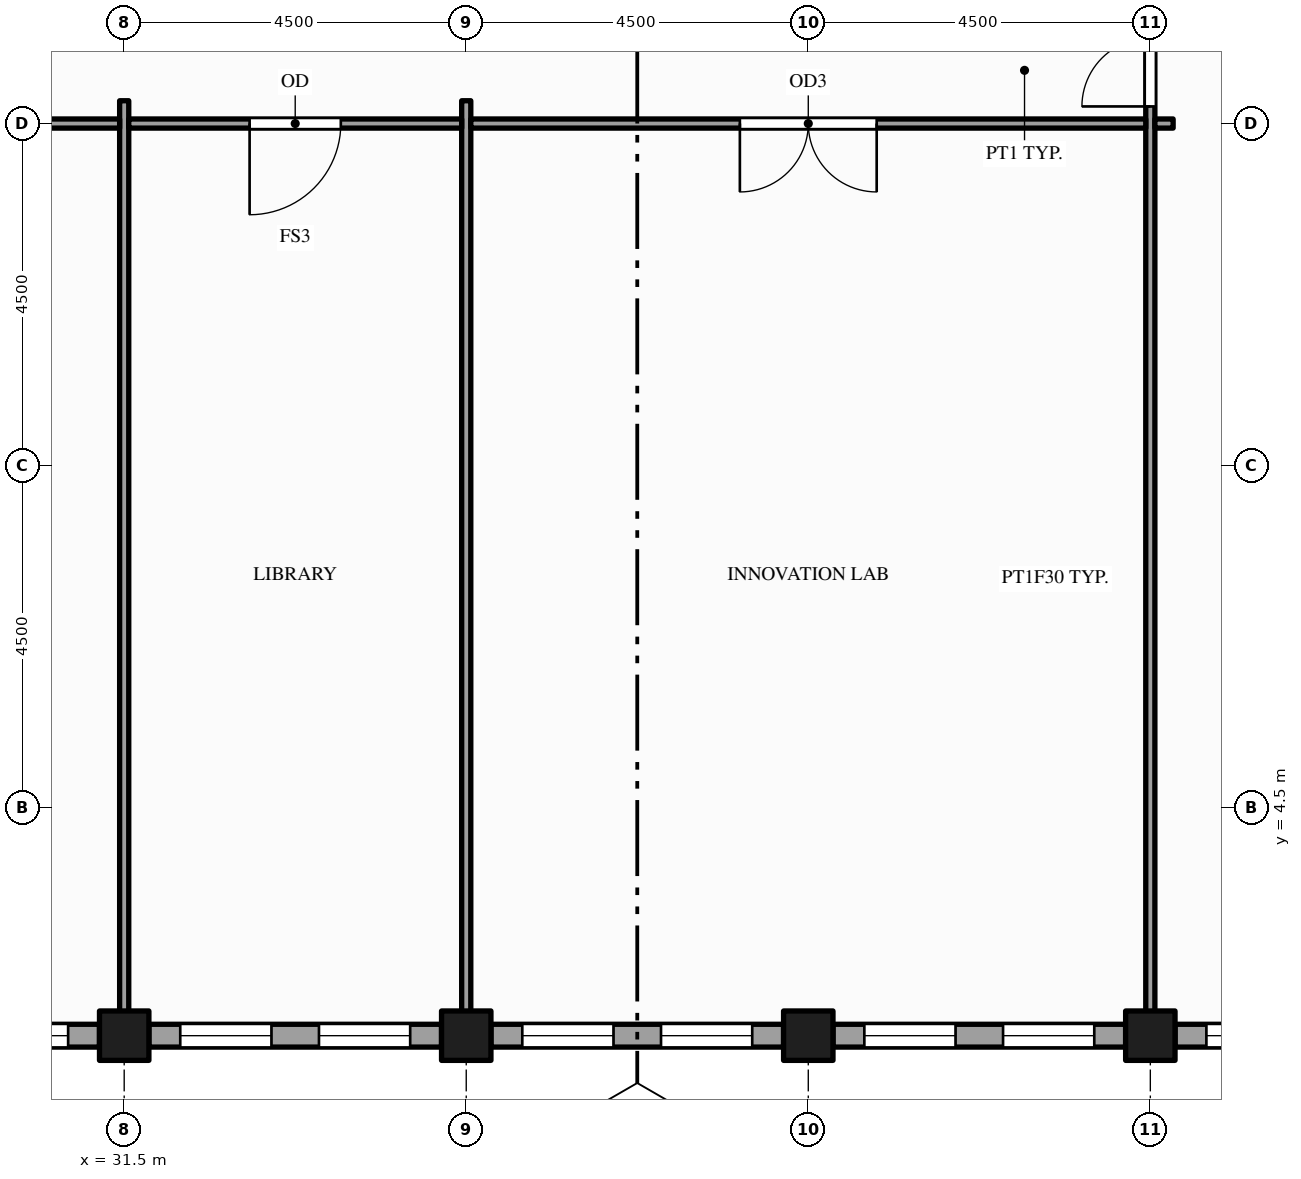
"""IFC4 building model, lengths in metres.
Left out: names, types, materials, properties, quantities, classifications, styles, units other than length and angle.
Written with IfcOpenShell. Run it as: python <this file> out.ifc"""

import sys

from ifc_helpers import new_model, si_unit, direction, frame, frame_2d, origin, origin_2d, place, context, subcontext, project, spatial, rectangle, hollow_rectangle, extrude, element, fill, save


model = new_model("IFC4")
c1 = context("Model", 3, precision=1e-05, world=origin(), true_north=direction((0.0, 1.0)))
c2 = subcontext(c1, "Body", "Model", "MODEL_VIEW")
j1 = project(units=[si_unit("LENGTHUNIT", "METRE"), si_unit("PLANEANGLEUNIT", "RADIAN")], contexts=[c1])
p1 = place(None, origin())
s1 = spatial("IfcSite", under=j1, at=p1, CompositionType="ELEMENT")
p2 = place(p1, origin())
s2 = spatial("IfcBuilding", under=s1, at=p2, CompositionType="ELEMENT")
p3 = place(p2, frame((0.0, 0.0, 281.0)))
s3 = spatial("IfcBuildingStorey", under=s2, at=p3, CompositionType="ELEMENT", Elevation=281.0)
for number, where, z_axis, x_axis in (
    (1, (31.5, 1.5, -0.15), (0.0, 0.0, 1.0), (1.0, 0.0, 0.0)),
    (2, (36.0, 1.5, -0.15), (0.0, 0.0, 1.0), (1.0, 0.0, 0.0)),
    (3, (40.5, 1.5, -0.15), (0.0, 0.0, 1.0), (1.0, 0.0, 0.0)),
    (4, (45.0, 1.5, -0.15), (0.0, 0.0, 1.0), (1.0, 0.0, 0.0)),
):
    element("IfcColumn", number, at=place(p3, frame(where, z_axis=z_axis, x_axis=x_axis)), inside=s3, PredefinedType="COLUMN", context=c2, shape_type="SweptSolid", body=[
        extrude(hollow_rectangle(XDim=0.65, YDim=0.65, WallThickness=0.032, at=origin_2d()), origin(), (0.0, 0.0, 1.0), 4.0),
    ])
p4 = place(p3, frame((27.325, 1.5, 0.0), z_axis=(0.0, 0.0, 1.0), x_axis=(1.0, 0.0, 0.0)))
e5 = element("IfcWall", 5, at=p4, inside=s3, PredefinedType="STANDARD", context=c2, shape_type="SweptSolid", body=[
    extrude(rectangle(XDim=3.85, YDim=0.3, at=frame_2d((1.925, 0.0))), origin(), (0.0, 0.0, 1.0), 2.87),
])
p5 = place(p4, frame((0.413, 0.0, 0.9)))
e6 = element("IfcOpeningElement", 6, at=p5, cuts=e5, PredefinedType="OPENING", context=c2, shape_type="SweptSolid", body=[
    extrude(rectangle(XDim=1.2, YDim=1.75, at=frame_2d((0.6, 0.875))), frame((0.0, 0.16, 0.0), z_axis=(0.0, -1.0, 0.0), x_axis=(1.0, 0.0, 0.0)), (0.0, 0.0, 1.0), 0.32),
])
p6 = place(p4, frame((2.238, 0.0, 0.9)))
e7 = element("IfcOpeningElement", 7, at=p6, cuts=e5, PredefinedType="OPENING", context=c2, shape_type="SweptSolid", body=[
    extrude(rectangle(XDim=1.2, YDim=1.75, at=frame_2d((0.6, 0.875))), frame((0.0, 0.16, 0.0), z_axis=(0.0, -1.0, 0.0), x_axis=(1.0, 0.0, 0.0)), (0.0, 0.0, 1.0), 0.32),
])
p7 = place(p3, frame((31.825, 1.5, 0.0), z_axis=(0.0, 0.0, 1.0), x_axis=(1.0, 0.0, 0.0)))
e8 = element("IfcWall", 8, at=p7, inside=s3, PredefinedType="STANDARD", context=c2, shape_type="SweptSolid", body=[
    extrude(rectangle(XDim=3.85, YDim=0.3, at=frame_2d((1.925, 0.0))), origin(), (0.0, 0.0, 1.0), 2.87),
])
p8 = place(p7, frame((0.413, 0.0, 0.9)))
e9 = element("IfcOpeningElement", 9, at=p8, cuts=e8, PredefinedType="OPENING", context=c2, shape_type="SweptSolid", body=[
    extrude(rectangle(XDim=1.2, YDim=1.75, at=frame_2d((0.6, 0.875))), frame((0.0, 0.16, 0.0), z_axis=(0.0, -1.0, 0.0), x_axis=(1.0, 0.0, 0.0)), (0.0, 0.0, 1.0), 0.32),
])
p9 = place(p7, frame((2.238, 0.0, 0.9)))
e10 = element("IfcOpeningElement", 10, at=p9, cuts=e8, PredefinedType="OPENING", context=c2, shape_type="SweptSolid", body=[
    extrude(rectangle(XDim=1.2, YDim=1.75, at=frame_2d((0.6, 0.875))), frame((0.0, 0.16, 0.0), z_axis=(0.0, -1.0, 0.0), x_axis=(1.0, 0.0, 0.0)), (0.0, 0.0, 1.0), 0.32),
])
p10 = place(p3, frame((36.325, 1.5, 0.0), z_axis=(0.0, 0.0, 1.0), x_axis=(1.0, 0.0, 0.0)))
e11 = element("IfcWall", 11, at=p10, inside=s3, PredefinedType="STANDARD", context=c2, shape_type="SweptSolid", body=[
    extrude(rectangle(XDim=3.85, YDim=0.3, at=frame_2d((1.925, 0.0))), origin(), (0.0, 0.0, 1.0), 2.87),
])
p11 = place(p10, frame((0.413, 0.0, 0.9)))
e12 = element("IfcOpeningElement", 12, at=p11, cuts=e11, PredefinedType="OPENING", context=c2, shape_type="SweptSolid", body=[
    extrude(rectangle(XDim=1.2, YDim=1.75, at=frame_2d((0.6, 0.875))), frame((0.0, 0.16, 0.0), z_axis=(0.0, -1.0, 0.0), x_axis=(1.0, 0.0, 0.0)), (0.0, 0.0, 1.0), 0.32),
])
p12 = place(p10, frame((2.238, 0.0, 0.9)))
e13 = element("IfcOpeningElement", 13, at=p12, cuts=e11, PredefinedType="OPENING", context=c2, shape_type="SweptSolid", body=[
    extrude(rectangle(XDim=1.2, YDim=1.75, at=frame_2d((0.6, 0.875))), frame((0.0, 0.16, 0.0), z_axis=(0.0, -1.0, 0.0), x_axis=(1.0, 0.0, 0.0)), (0.0, 0.0, 1.0), 0.32),
])
p13 = place(p3, frame((40.825, 1.5, 0.0), z_axis=(0.0, 0.0, 1.0), x_axis=(1.0, 0.0, 0.0)))
e14 = element("IfcWall", 14, at=p13, inside=s3, PredefinedType="STANDARD", context=c2, shape_type="SweptSolid", body=[
    extrude(rectangle(XDim=3.85, YDim=0.3, at=frame_2d((1.925, 0.0))), origin(), (0.0, 0.0, 1.0), 2.87),
])
p14 = place(p13, frame((0.413, 0.0, 0.9)))
e15 = element("IfcOpeningElement", 15, at=p14, cuts=e14, PredefinedType="OPENING", context=c2, shape_type="SweptSolid", body=[
    extrude(rectangle(XDim=1.2, YDim=1.75, at=frame_2d((0.6, 0.875))), frame((0.0, 0.16, 0.0), z_axis=(0.0, -1.0, 0.0), x_axis=(1.0, 0.0, 0.0)), (0.0, 0.0, 1.0), 0.32),
])
p15 = place(p13, frame((2.238, 0.0, 0.9)))
e16 = element("IfcOpeningElement", 16, at=p15, cuts=e14, PredefinedType="OPENING", context=c2, shape_type="SweptSolid", body=[
    extrude(rectangle(XDim=1.2, YDim=1.75, at=frame_2d((0.6, 0.875))), frame((0.0, 0.16, 0.0), z_axis=(0.0, -1.0, 0.0), x_axis=(1.0, 0.0, 0.0)), (0.0, 0.0, 1.0), 0.32),
])
p16 = place(p3, frame((45.325, 1.5, 0.0), z_axis=(0.0, 0.0, 1.0), x_axis=(1.0, 0.0, 0.0)))
e17 = element("IfcWall", 17, at=p16, inside=s3, PredefinedType="STANDARD", context=c2, shape_type="SweptSolid", body=[
    extrude(rectangle(XDim=3.85, YDim=0.3, at=frame_2d((1.925, 0.0))), origin(), (0.0, 0.0, 1.0), 2.87),
])
p17 = place(p16, frame((0.413, 0.0, 0.9)))
e18 = element("IfcOpeningElement", 18, at=p17, cuts=e17, PredefinedType="OPENING", context=c2, shape_type="SweptSolid", body=[
    extrude(rectangle(XDim=1.2, YDim=1.75, at=frame_2d((0.6, 0.875))), frame((0.0, 0.16, 0.0), z_axis=(0.0, -1.0, 0.0), x_axis=(1.0, 0.0, 0.0)), (0.0, 0.0, 1.0), 0.32),
])
p18 = place(p16, frame((2.238, 0.0, 0.9)))
e19 = element("IfcOpeningElement", 19, at=p18, cuts=e17, PredefinedType="OPENING", context=c2, shape_type="SweptSolid", body=[
    extrude(rectangle(XDim=1.2, YDim=1.75, at=frame_2d((0.6, 0.875))), frame((0.0, 0.16, 0.0), z_axis=(0.0, -1.0, 0.0), x_axis=(1.0, 0.0, 0.0)), (0.0, 0.0, 1.0), 0.32),
])
for number, where, z_axis, x_axis in (
    (20, (31.5, 1.65, 0.0), (0.0, 0.0, 1.0), (0.0, 1.0, 0.0)),
    (21, (36.0, 1.65, 0.0), (0.0, 0.0, 1.0), (0.0, 1.0, 0.0)),
):
    element("IfcWall", number, at=place(p3, frame(where, z_axis=z_axis, x_axis=x_axis)), inside=s3, PredefinedType="PARTITIONING", context=c2, shape_type="SweptSolid", body=[
        extrude(rectangle(XDim=12.15, YDim=0.12, at=frame_2d((6.075, 0.0))), origin(), (0.0, 0.0, 1.0), 2.87),
    ])
p19 = place(p3, frame((45.0, 1.65, 0.0), z_axis=(0.0, 0.0, 1.0), x_axis=(0.0, 1.0, 0.0)))
e22 = element("IfcWall", 22, at=p19, inside=s3, PredefinedType="PARTITIONING", context=c2, shape_type="SweptSolid", body=[
    extrude(rectangle(XDim=22.2, YDim=0.12, at=frame_2d((11.1, 0.0))), origin(), (0.0, 0.0, 1.0), 2.87),
])
p20 = place(p19, frame((12.075, 0.0, 0.0)))
e23 = element("IfcOpeningElement", 23, at=p20, cuts=e22, PredefinedType="OPENING", context=c2, shape_type="SweptSolid", body=[
    extrude(rectangle(XDim=1.8, YDim=2.1, at=frame_2d((0.9, 1.05))), frame((0.0, 0.07, 0.0), z_axis=(0.0, -1.0, 0.0), x_axis=(1.0, 0.0, 0.0)), (0.0, 0.0, 1.0), 0.14),
])
p21 = place(p19, frame((15.1, 0.0, 0.0)))
e24 = element("IfcOpeningElement", 24, at=p21, cuts=e22, PredefinedType="OPENING", context=c2, shape_type="SweptSolid", body=[
    extrude(rectangle(XDim=0.9, YDim=2.1, at=frame_2d((0.45, 1.05))), frame((0.0, 0.07, 0.0), z_axis=(0.0, -1.0, 0.0), x_axis=(1.0, 0.0, 0.0)), (0.0, 0.0, 1.0), 0.14),
])
p22 = place(p19, frame((17.775, 0.0, 0.0)))
e25 = element("IfcOpeningElement", 25, at=p22, cuts=e22, PredefinedType="OPENING", context=c2, shape_type="SweptSolid", body=[
    extrude(rectangle(XDim=0.9, YDim=2.1, at=frame_2d((0.45, 1.05))), frame((0.0, 0.07, 0.0), z_axis=(0.0, -1.0, 0.0), x_axis=(1.0, 0.0, 0.0)), (0.0, 0.0, 1.0), 0.14),
])
p23 = place(p19, frame((20.35, 0.0, 0.0)))
e26 = element("IfcOpeningElement", 26, at=p23, cuts=e22, PredefinedType="OPENING", context=c2, shape_type="SweptSolid", body=[
    extrude(rectangle(XDim=1.0, YDim=2.1, at=frame_2d((0.5, 1.05))), frame((0.0, 0.07, 0.0), z_axis=(0.0, -1.0, 0.0), x_axis=(1.0, 0.0, 0.0)), (0.0, 0.0, 1.0), 0.14),
])
p24 = place(p3, frame((27.06, 13.5, 0.0), z_axis=(0.0, 0.0, 1.0), x_axis=(1.0, 0.0, 0.0)))
e27 = element("IfcWall", 27, at=p24, inside=s3, PredefinedType="PARTITIONING", context=c2, shape_type="SweptSolid", body=[
    extrude(rectangle(XDim=4.38, YDim=0.12, at=frame_2d((2.19, 0.0))), origin(), (0.0, 0.0, 1.0), 2.87),
])
p25 = place(p24, frame((1.69, 0.0, 0.0)))
e28 = element("IfcOpeningElement", 28, at=p25, cuts=e27, PredefinedType="OPENING", context=c2, shape_type="SweptSolid", body=[
    extrude(rectangle(XDim=1.0, YDim=2.1, at=frame_2d((0.5, 1.05))), frame((0.0, 0.07, 0.0), z_axis=(0.0, -1.0, 0.0), x_axis=(1.0, 0.0, 0.0)), (0.0, 0.0, 1.0), 0.14),
])
p26 = place(p3, frame((31.56, 13.5, 0.0), z_axis=(0.0, 0.0, 1.0), x_axis=(1.0, 0.0, 0.0)))
e29 = element("IfcWall", 29, at=p26, inside=s3, PredefinedType="PARTITIONING", context=c2, shape_type="SweptSolid", body=[
    extrude(rectangle(XDim=4.38, YDim=0.12, at=frame_2d((2.19, 0.0))), origin(), (0.0, 0.0, 1.0), 2.87),
])
p27 = place(p26, frame((1.59, 0.0, 0.0)))
e30 = element("IfcOpeningElement", 30, at=p27, cuts=e29, PredefinedType="OPENING", context=c2, shape_type="SweptSolid", body=[
    extrude(rectangle(XDim=1.2, YDim=2.1, at=frame_2d((0.6, 1.05))), frame((0.0, 0.07, 0.0), z_axis=(0.0, -1.0, 0.0), x_axis=(1.0, 0.0, 0.0)), (0.0, 0.0, 1.0), 0.14),
])
p28 = place(p3, frame((36.06, 13.5, 0.0), z_axis=(0.0, 0.0, 1.0), x_axis=(1.0, 0.0, 0.0)))
e31 = element("IfcWall", 31, at=p28, inside=s3, PredefinedType="PARTITIONING", context=c2, shape_type="SweptSolid", body=[
    extrude(rectangle(XDim=8.88, YDim=0.12, at=frame_2d((4.44, 0.0))), origin(), (0.0, 0.0, 1.0), 2.87),
])
p29 = place(p28, frame((3.54, 0.0, 0.0)))
e32 = element("IfcOpeningElement", 32, at=p29, cuts=e31, PredefinedType="OPENING", context=c2, shape_type="SweptSolid", body=[
    extrude(rectangle(XDim=1.8, YDim=2.1, at=frame_2d((0.9, 1.05))), frame((0.0, 0.07, 0.0), z_axis=(0.0, -1.0, 0.0), x_axis=(1.0, 0.0, 0.0)), (0.0, 0.0, 1.0), 0.14),
])
p30 = place(p3, frame((45.06, 13.5, 0.0), z_axis=(0.0, 0.0, 1.0), x_axis=(1.0, 0.0, 0.0)))
e33 = element("IfcWall", 33, at=p30, inside=s3, PredefinedType="PARTITIONING", context=c2, shape_type="SweptSolid", body=[
    extrude(rectangle(XDim=0.24, YDim=0.12, at=frame_2d((0.12, 0.0))), origin(), (0.0, 0.0, 1.0), 2.87),
])
p31 = place(p6, origin())
e34 = element("IfcWindow", 34, at=p31, inside=s3, PartitioningType="SINGLE_PANEL", PredefinedType="WINDOW", context=c2, shape_type="SweptSolid", body=[
    extrude(rectangle(XDim=1.2, YDim=1.75, at=frame_2d((0.6, 0.875))), frame((0.0, 0.03, 0.0), z_axis=(0.0, -1.0, 0.0), x_axis=(1.0, 0.0, 0.0)), (0.0, 0.0, 1.0), 0.06),
])
fill(e7, e34)
p32 = place(p8, origin())
e35 = element("IfcWindow", 35, at=p32, inside=s3, PartitioningType="SINGLE_PANEL", PredefinedType="WINDOW", context=c2, shape_type="SweptSolid", body=[
    extrude(rectangle(XDim=1.2, YDim=1.75, at=frame_2d((0.6, 0.875))), frame((0.0, 0.03, 0.0), z_axis=(0.0, -1.0, 0.0), x_axis=(1.0, 0.0, 0.0)), (0.0, 0.0, 1.0), 0.06),
])
fill(e9, e35)
p33 = place(p9, origin())
e36 = element("IfcWindow", 36, at=p33, inside=s3, PartitioningType="SINGLE_PANEL", PredefinedType="WINDOW", context=c2, shape_type="SweptSolid", body=[
    extrude(rectangle(XDim=1.2, YDim=1.75, at=frame_2d((0.6, 0.875))), frame((0.0, 0.03, 0.0), z_axis=(0.0, -1.0, 0.0), x_axis=(1.0, 0.0, 0.0)), (0.0, 0.0, 1.0), 0.06),
])
fill(e10, e36)
p34 = place(p11, origin())
e37 = element("IfcWindow", 37, at=p34, inside=s3, PartitioningType="SINGLE_PANEL", PredefinedType="WINDOW", context=c2, shape_type="SweptSolid", body=[
    extrude(rectangle(XDim=1.2, YDim=1.75, at=frame_2d((0.6, 0.875))), frame((0.0, 0.03, 0.0), z_axis=(0.0, -1.0, 0.0), x_axis=(1.0, 0.0, 0.0)), (0.0, 0.0, 1.0), 0.06),
])
fill(e12, e37)
p35 = place(p12, origin())
e38 = element("IfcWindow", 38, at=p35, inside=s3, PartitioningType="SINGLE_PANEL", PredefinedType="WINDOW", context=c2, shape_type="SweptSolid", body=[
    extrude(rectangle(XDim=1.2, YDim=1.75, at=frame_2d((0.6, 0.875))), frame((0.0, 0.03, 0.0), z_axis=(0.0, -1.0, 0.0), x_axis=(1.0, 0.0, 0.0)), (0.0, 0.0, 1.0), 0.06),
])
fill(e13, e38)
p36 = place(p14, origin())
e39 = element("IfcWindow", 39, at=p36, inside=s3, PartitioningType="SINGLE_PANEL", PredefinedType="WINDOW", context=c2, shape_type="SweptSolid", body=[
    extrude(rectangle(XDim=1.2, YDim=1.75, at=frame_2d((0.6, 0.875))), frame((0.0, 0.03, 0.0), z_axis=(0.0, -1.0, 0.0), x_axis=(1.0, 0.0, 0.0)), (0.0, 0.0, 1.0), 0.06),
])
fill(e15, e39)
p37 = place(p15, origin())
e40 = element("IfcWindow", 40, at=p37, inside=s3, PartitioningType="SINGLE_PANEL", PredefinedType="WINDOW", context=c2, shape_type="SweptSolid", body=[
    extrude(rectangle(XDim=1.2, YDim=1.75, at=frame_2d((0.6, 0.875))), frame((0.0, 0.03, 0.0), z_axis=(0.0, -1.0, 0.0), x_axis=(1.0, 0.0, 0.0)), (0.0, 0.0, 1.0), 0.06),
])
fill(e16, e40)
p38 = place(p17, origin())
e41 = element("IfcWindow", 41, at=p38, inside=s3, PartitioningType="SINGLE_PANEL", PredefinedType="WINDOW", context=c2, shape_type="SweptSolid", body=[
    extrude(rectangle(XDim=1.2, YDim=1.75, at=frame_2d((0.6, 0.875))), frame((0.0, 0.03, 0.0), z_axis=(0.0, -1.0, 0.0), x_axis=(1.0, 0.0, 0.0)), (0.0, 0.0, 1.0), 0.06),
])
fill(e18, e41)
p39 = place(p20, origin())
e42 = element("IfcDoor", 42, at=p39, inside=s3, OperationType="DOUBLE_DOOR_SINGLE_SWING", PredefinedType="DOOR", context=c2, shape_type="SweptSolid", body=[
    extrude(rectangle(XDim=1.8, YDim=2.1, at=frame_2d((0.9, 1.05))), frame((0.0, 0.025, 0.0), z_axis=(0.0, -1.0, 0.0), x_axis=(1.0, 0.0, 0.0)), (0.0, 0.0, 1.0), 0.05),
])
fill(e23, e42)
p40 = place(p27, origin())
e43 = element("IfcDoor", 43, at=p40, inside=s3, OperationType="SINGLE_SWING_LEFT", PredefinedType="DOOR", context=c2, shape_type="SweptSolid", body=[
    extrude(rectangle(XDim=1.2, YDim=2.1, at=frame_2d((0.6, 1.05))), frame((0.0, 0.025, 0.0), z_axis=(0.0, -1.0, 0.0), x_axis=(1.0, 0.0, 0.0)), (0.0, 0.0, 1.0), 0.05),
])
fill(e30, e43)
p41 = place(p29, origin())
e44 = element("IfcDoor", 44, at=p41, inside=s3, OperationType="DOUBLE_DOOR_SINGLE_SWING", PredefinedType="DOOR", context=c2, shape_type="SweptSolid", body=[
    extrude(rectangle(XDim=1.8, YDim=2.1, at=frame_2d((0.9, 1.05))), frame((0.0, 0.025, 0.0), z_axis=(0.0, -1.0, 0.0), x_axis=(1.0, 0.0, 0.0)), (0.0, 0.0, 1.0), 0.05),
])
fill(e32, e44)
save(model, sys.argv[1])
